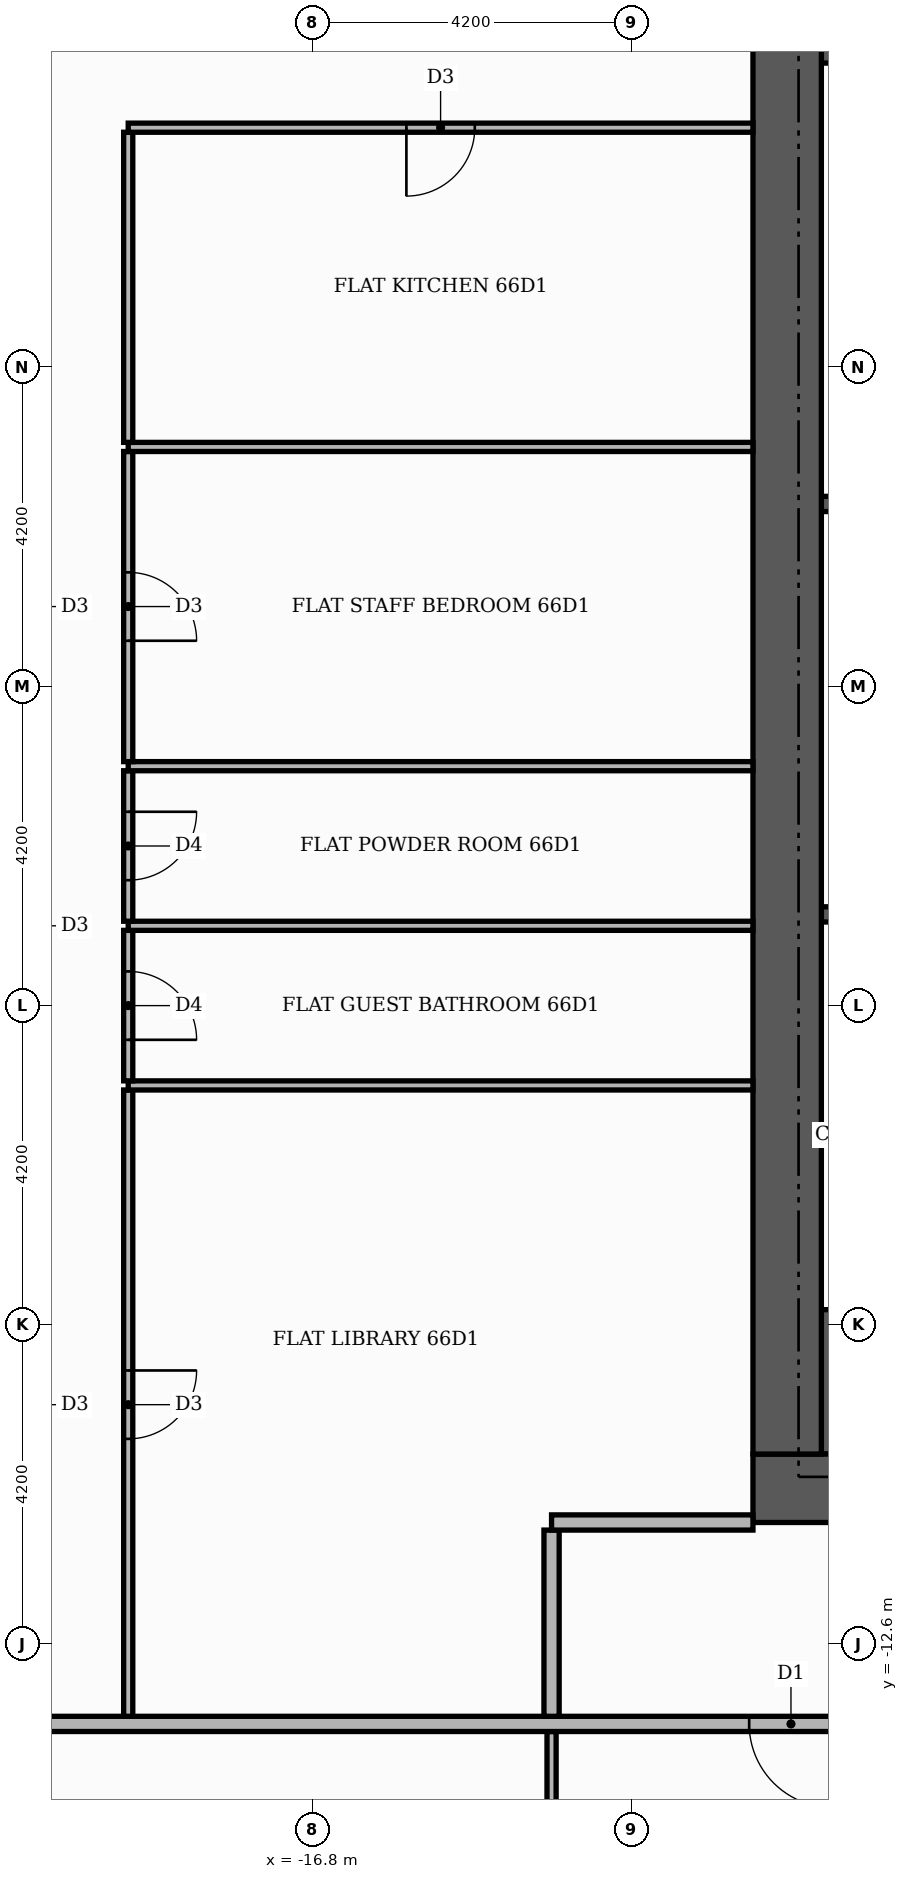
"""IFC4 building model, lengths in metres.
Left out: names, types, materials, properties, quantities, classifications, styles, units other than length and angle.
Written with IfcOpenShell. Run it as: python <this file> out.ifc"""

import sys

from ifc_helpers import new_model, si_unit, direction, frame, frame_2d, origin, place, context, subcontext, project, spatial, rectangle, extrude, element, fill, save


model = new_model("IFC4")
c1 = context("Model", 3, precision=1e-05, world=origin(), true_north=direction((0.0, 1.0)))
c2 = subcontext(c1, "Body", "Model", "MODEL_VIEW")
j1 = project(units=[si_unit("LENGTHUNIT", "METRE"), si_unit("PLANEANGLEUNIT", "RADIAN")], contexts=[c1])
p1 = place(None, origin())
s1 = spatial("IfcSite", under=j1, at=p1, CompositionType="ELEMENT")
p2 = place(p1, origin())
s2 = spatial("IfcBuilding", under=s1, at=p2, CompositionType="ELEMENT")
p3 = place(p2, frame((0.0, 0.0, 275.7)))
s3 = spatial("IfcBuildingStorey", under=s2, at=p3, CompositionType="ELEMENT", Elevation=275.7)
for number, where, z_axis, x_axis in (
    (1, (-10.1, -9.15, 0.0), (0.0, 0.0, 1.0), (1.0, 0.0, 0.0)),
    (2, (-10.1, 9.15, 0.0), (0.0, 0.0, 1.0), (1.0, 0.0, 0.0)),
):
    element("IfcWall", number, at=place(p3, frame(where, z_axis=z_axis, x_axis=x_axis)), inside=s3, PredefinedType="SHEAR", context=c2, shape_type="SweptSolid", body=[
        extrude(rectangle(XDim=4.6, YDim=1.9, at=frame_2d((2.3, 0.0))), origin(), (0.0, 0.0, 1.0), 3.48),
    ])
for number, where, z_axis, x_axis in (
    (3, (-10.1, -3.0, 0.0), (0.0, 0.0, 1.0), (1.0, 0.0, 0.0)),
    (4, (-10.1, 2.4, 0.0), (0.0, 0.0, 1.0), (1.0, 0.0, 0.0)),
):
    element("IfcWall", number, at=place(p3, frame(where, z_axis=z_axis, x_axis=x_axis)), inside=s3, PredefinedType="SHEAR", context=c2, shape_type="SweptSolid", body=[
        extrude(rectangle(XDim=0.9, YDim=0.2, at=frame_2d((0.45, 0.0))), origin(), (0.0, 0.0, 1.0), 3.48),
    ])
p4 = place(p3, frame((-11.0, -10.55, 0.0), z_axis=(0.0, 0.0, 1.0), x_axis=(1.0, 0.0, 0.0)))
e5 = element("IfcWall", 5, at=p4, inside=s3, PredefinedType="SHEAR", context=c2, shape_type="SweptSolid", body=[
    extrude(rectangle(XDim=22.0, YDim=0.9, at=frame_2d((11.0, 0.0))), origin(), (0.0, 0.0, 1.0), 3.48),
])
p5 = place(p4, frame((7.4, 0.0, 0.0)))
e6 = element("IfcOpeningElement", 6, at=p5, cuts=e5, PredefinedType="OPENING", context=c2, shape_type="SweptSolid", body=[
    extrude(rectangle(XDim=1.8, YDim=2.2, at=frame_2d((0.9, 1.1))), frame((0.0, 0.46, 0.0), z_axis=(0.0, -1.0, 0.0), x_axis=(1.0, 0.0, 0.0)), (0.0, 0.0, 1.0), 0.92),
])
p6 = place(p3, frame((-10.55, -10.1, 0.0), z_axis=(0.0, 0.0, 1.0), x_axis=(0.0, 1.0, 0.0)))
e7 = element("IfcWall", 7, at=p6, inside=s3, PredefinedType="SHEAR", context=c2, shape_type="SweptSolid", body=[
    extrude(rectangle(XDim=20.2, YDim=0.9, at=frame_2d((10.1, 0.0))), origin(), (0.0, 0.0, 1.0), 3.48),
])
p7 = place(p3, frame((-13.65, -20.36, 0.0), z_axis=(0.0, 0.0, 1.0), x_axis=(0.0, 1.0, 0.0)))
e8 = element("IfcWall", 8, at=p7, inside=s3, PredefinedType="PARTITIONING", context=c2, shape_type="SweptSolid", body=[
    extrude(rectangle(XDim=6.61, YDim=0.12, at=frame_2d((3.305, 0.0))), origin(), (0.0, 0.0, 1.0), 3.48),
])
p8 = place(p7, frame((2.875, 0.0, 0.0)))
e9 = element("IfcOpeningElement", 9, at=p8, cuts=e8, PredefinedType="OPENING", context=c2, shape_type="SweptSolid", body=[
    extrude(rectangle(XDim=0.9, YDim=2.1, at=frame_2d((0.45, 1.05))), frame((0.0, 0.07, 0.0), z_axis=(0.0, -1.0, 0.0), x_axis=(1.0, 0.0, 0.0)), (0.0, 0.0, 1.0), 0.14),
])
p9 = place(p3, frame((-25.42, -13.65, 0.0), z_axis=(0.0, 0.0, 1.0), x_axis=(1.0, 0.0, 0.0)))
e10 = element("IfcWall", 10, at=p9, inside=s3, PredefinedType="PARTITIONING", context=c2, shape_type="SweptSolid", body=[
    extrude(rectangle(XDim=39.07, YDim=0.2, at=frame_2d((19.535, 0.0))), origin(), (0.0, 0.0, 1.0), 3.48),
])
p10 = place(p9, frame((14.37, 0.0, 0.0)))
e11 = element("IfcOpeningElement", 11, at=p10, cuts=e10, PredefinedType="OPENING", context=c2, shape_type="SweptSolid", body=[
    extrude(rectangle(XDim=1.1, YDim=2.4, at=frame_2d((0.55, 1.2))), frame((0.0, 0.11, 0.0), z_axis=(0.0, -1.0, 0.0), x_axis=(1.0, 0.0, 0.0)), (0.0, 0.0, 1.0), 0.22),
])
p11 = place(p3, frame((-19.22, -13.55, 0.0), z_axis=(0.0, 0.0, 1.0), x_axis=(0.0, 1.0, 0.0)))
e12 = element("IfcWall", 12, at=p11, inside=s3, PredefinedType="PARTITIONING", context=c2, shape_type="SweptSolid", body=[
    extrude(rectangle(XDim=8.24, YDim=0.12, at=frame_2d((4.12, 0.0))), origin(), (0.0, 0.0, 1.0), 3.48),
])
p12 = place(p11, frame((3.65, 0.0, 0.0)))
e13 = element("IfcOpeningElement", 13, at=p12, cuts=e12, PredefinedType="OPENING", context=c2, shape_type="SweptSolid", body=[
    extrude(rectangle(XDim=0.9, YDim=2.1, at=frame_2d((0.45, 1.05))), frame((0.0, 0.07, 0.0), z_axis=(0.0, -1.0, 0.0), x_axis=(1.0, 0.0, 0.0)), (0.0, 0.0, 1.0), 0.14),
])
p13 = place(p3, frame((-13.65, -13.55, 0.0), z_axis=(0.0, 0.0, 1.0), x_axis=(0.0, 1.0, 0.0)))
e14 = element("IfcWall", 14, at=p13, inside=s3, PredefinedType="PARTITIONING", context=c2, shape_type="SweptSolid", body=[
    extrude(rectangle(XDim=2.45, YDim=0.2, at=frame_2d((1.225, 0.0))), origin(), (0.0, 0.0, 1.0), 3.48),
])
p14 = place(p3, frame((-13.65, -11.0, 0.0), z_axis=(0.0, 0.0, 1.0), x_axis=(1.0, 0.0, 0.0)))
e15 = element("IfcWall", 15, at=p14, inside=s3, PredefinedType="PARTITIONING", context=c2, shape_type="SweptSolid", body=[
    extrude(rectangle(XDim=2.65, YDim=0.2, at=frame_2d((1.325, 0.0))), origin(), (0.0, 0.0, 1.0), 3.48),
])
p15 = place(p3, frame((-19.22, -5.25, 0.0), z_axis=(0.0, 0.0, 1.0), x_axis=(1.0, 0.0, 0.0)))
e16 = element("IfcWall", 16, at=p15, inside=s3, PredefinedType="PARTITIONING", context=c2, shape_type="SweptSolid", body=[
    extrude(rectangle(XDim=8.22, YDim=0.12, at=frame_2d((4.11, 0.0))), origin(), (0.0, 0.0, 1.0), 3.48),
])
p16 = place(p3, frame((-19.22, -5.19, 0.0), z_axis=(0.0, 0.0, 1.0), x_axis=(0.0, 1.0, 0.0)))
e17 = element("IfcWall", 17, at=p16, inside=s3, PredefinedType="PARTITIONING", context=c2, shape_type="SweptSolid", body=[
    extrude(rectangle(XDim=1.98, YDim=0.12, at=frame_2d((0.99, 0.0))), origin(), (0.0, 0.0, 1.0), 3.48),
])
p17 = place(p16, frame((0.54, 0.0, 0.0)))
e18 = element("IfcOpeningElement", 18, at=p17, cuts=e17, PredefinedType="OPENING", context=c2, shape_type="SweptSolid", body=[
    extrude(rectangle(XDim=0.9, YDim=2.1, at=frame_2d((0.45, 1.05))), frame((0.0, 0.07, 0.0), z_axis=(0.0, -1.0, 0.0), x_axis=(1.0, 0.0, 0.0)), (0.0, 0.0, 1.0), 0.14),
])
p18 = place(p3, frame((-19.22, -3.15, 0.0), z_axis=(0.0, 0.0, 1.0), x_axis=(1.0, 0.0, 0.0)))
e19 = element("IfcWall", 19, at=p18, inside=s3, PredefinedType="PARTITIONING", context=c2, shape_type="SweptSolid", body=[
    extrude(rectangle(XDim=8.22, YDim=0.12, at=frame_2d((4.11, 0.0))), origin(), (0.0, 0.0, 1.0), 3.48),
])
p19 = place(p3, frame((-19.22, -3.09, 0.0), z_axis=(0.0, 0.0, 1.0), x_axis=(0.0, 1.0, 0.0)))
e20 = element("IfcWall", 20, at=p19, inside=s3, PredefinedType="PARTITIONING", context=c2, shape_type="SweptSolid", body=[
    extrude(rectangle(XDim=1.98, YDim=0.12, at=frame_2d((0.99, 0.0))), origin(), (0.0, 0.0, 1.0), 3.48),
])
p20 = place(p19, frame((0.54, 0.0, 0.0)))
e21 = element("IfcOpeningElement", 21, at=p20, cuts=e20, PredefinedType="OPENING", context=c2, shape_type="SweptSolid", body=[
    extrude(rectangle(XDim=0.9, YDim=2.1, at=frame_2d((0.45, 1.05))), frame((0.0, 0.07, 0.0), z_axis=(0.0, -1.0, 0.0), x_axis=(1.0, 0.0, 0.0)), (0.0, 0.0, 1.0), 0.14),
])
p21 = place(p3, frame((-19.22, -1.05, 0.0), z_axis=(0.0, 0.0, 1.0), x_axis=(1.0, 0.0, 0.0)))
e22 = element("IfcWall", 22, at=p21, inside=s3, PredefinedType="PARTITIONING", context=c2, shape_type="SweptSolid", body=[
    extrude(rectangle(XDim=8.22, YDim=0.12, at=frame_2d((4.11, 0.0))), origin(), (0.0, 0.0, 1.0), 3.48),
])
p22 = place(p3, frame((-19.22, -0.99, 0.0), z_axis=(0.0, 0.0, 1.0), x_axis=(0.0, 1.0, 0.0)))
e23 = element("IfcWall", 23, at=p22, inside=s3, PredefinedType="PARTITIONING", context=c2, shape_type="SweptSolid", body=[
    extrude(rectangle(XDim=4.08, YDim=0.12, at=frame_2d((2.04, 0.0))), origin(), (0.0, 0.0, 1.0), 3.48),
])
p23 = place(p22, frame((1.59, 0.0, 0.0)))
e24 = element("IfcOpeningElement", 24, at=p23, cuts=e23, PredefinedType="OPENING", context=c2, shape_type="SweptSolid", body=[
    extrude(rectangle(XDim=0.9, YDim=2.1, at=frame_2d((0.45, 1.05))), frame((0.0, 0.07, 0.0), z_axis=(0.0, -1.0, 0.0), x_axis=(1.0, 0.0, 0.0)), (0.0, 0.0, 1.0), 0.14),
])
p24 = place(p3, frame((-19.22, 3.15, 0.0), z_axis=(0.0, 0.0, 1.0), x_axis=(1.0, 0.0, 0.0)))
e25 = element("IfcWall", 25, at=p24, inside=s3, PredefinedType="PARTITIONING", context=c2, shape_type="SweptSolid", body=[
    extrude(rectangle(XDim=8.22, YDim=0.12, at=frame_2d((4.11, 0.0))), origin(), (0.0, 0.0, 1.0), 3.48),
])
p25 = place(p3, frame((-19.22, 3.21, 0.0), z_axis=(0.0, 0.0, 1.0), x_axis=(0.0, 1.0, 0.0)))
e26 = element("IfcWall", 26, at=p25, inside=s3, PredefinedType="PARTITIONING", context=c2, shape_type="SweptSolid", body=[
    extrude(rectangle(XDim=4.08, YDim=0.12, at=frame_2d((2.04, 0.0))), origin(), (0.0, 0.0, 1.0), 3.48),
])
p26 = place(p3, frame((-19.22, 7.35, 0.0), z_axis=(0.0, 0.0, 1.0), x_axis=(1.0, 0.0, 0.0)))
e27 = element("IfcWall", 27, at=p26, inside=s3, PredefinedType="PARTITIONING", context=c2, shape_type="SweptSolid", body=[
    extrude(rectangle(XDim=8.22, YDim=0.12, at=frame_2d((4.11, 0.0))), origin(), (0.0, 0.0, 1.0), 3.48),
])
p27 = place(p26, frame((3.66, 0.0, 0.0)))
e28 = element("IfcOpeningElement", 28, at=p27, cuts=e27, PredefinedType="OPENING", context=c2, shape_type="SweptSolid", body=[
    extrude(rectangle(XDim=0.9, YDim=2.1, at=frame_2d((0.45, 1.05))), frame((0.0, 0.07, 0.0), z_axis=(0.0, -1.0, 0.0), x_axis=(1.0, 0.0, 0.0)), (0.0, 0.0, 1.0), 0.14),
])
p28 = place(p10, frame((1.1, 0.0, 0.0), z_axis=(0.0, 0.0, 1.0), x_axis=(-1.0, 0.0, 0.0)))
e29 = element("IfcDoor", 29, at=p28, inside=s3, OperationType="SINGLE_SWING_RIGHT", PredefinedType="DOOR", context=c2, shape_type="SweptSolid", body=[
    extrude(rectangle(XDim=1.1, YDim=2.4, at=frame_2d((0.55, 1.2))), frame((0.0, 0.025, 0.0), z_axis=(0.0, -1.0, 0.0), x_axis=(1.0, 0.0, 0.0)), (0.0, 0.0, 1.0), 0.05),
])
fill(e11, e29)
p29 = place(p27, frame((0.9, 0.0, 0.0), z_axis=(0.0, 0.0, 1.0), x_axis=(-1.0, 0.0, 0.0)))
e30 = element("IfcDoor", 30, at=p29, inside=s3, OperationType="SINGLE_SWING_LEFT", PredefinedType="DOOR", context=c2, shape_type="SweptSolid", body=[
    extrude(rectangle(XDim=0.9, YDim=2.1, at=frame_2d((0.45, 1.05))), frame((0.0, 0.025, 0.0), z_axis=(0.0, -1.0, 0.0), x_axis=(1.0, 0.0, 0.0)), (0.0, 0.0, 1.0), 0.05),
])
fill(e28, e30)
p30 = place(p23, frame((0.9, 0.0, 0.0), z_axis=(0.0, 0.0, 1.0), x_axis=(-1.0, 0.0, 0.0)))
e31 = element("IfcDoor", 31, at=p30, inside=s3, OperationType="SINGLE_SWING_LEFT", PredefinedType="DOOR", context=c2, shape_type="SweptSolid", body=[
    extrude(rectangle(XDim=0.9, YDim=2.1, at=frame_2d((0.45, 1.05))), frame((0.0, 0.025, 0.0), z_axis=(0.0, -1.0, 0.0), x_axis=(1.0, 0.0, 0.0)), (0.0, 0.0, 1.0), 0.05),
])
fill(e24, e31)
p31 = place(p20, frame((0.9, 0.0, 0.0), z_axis=(0.0, 0.0, 1.0), x_axis=(-1.0, 0.0, 0.0)))
e32 = element("IfcDoor", 32, at=p31, inside=s3, OperationType="SINGLE_SWING_RIGHT", PredefinedType="DOOR", context=c2, shape_type="SweptSolid", body=[
    extrude(rectangle(XDim=0.9, YDim=2.1, at=frame_2d((0.45, 1.05))), frame((0.0, 0.025, 0.0), z_axis=(0.0, -1.0, 0.0), x_axis=(1.0, 0.0, 0.0)), (0.0, 0.0, 1.0), 0.05),
])
fill(e21, e32)
p32 = place(p17, frame((0.9, 0.0, 0.0), z_axis=(0.0, 0.0, 1.0), x_axis=(-1.0, 0.0, 0.0)))
e33 = element("IfcDoor", 33, at=p32, inside=s3, OperationType="SINGLE_SWING_LEFT", PredefinedType="DOOR", context=c2, shape_type="SweptSolid", body=[
    extrude(rectangle(XDim=0.9, YDim=2.1, at=frame_2d((0.45, 1.05))), frame((0.0, 0.025, 0.0), z_axis=(0.0, -1.0, 0.0), x_axis=(1.0, 0.0, 0.0)), (0.0, 0.0, 1.0), 0.05),
])
fill(e18, e33)
p33 = place(p12, frame((0.9, 0.0, 0.0), z_axis=(0.0, 0.0, 1.0), x_axis=(-1.0, 0.0, 0.0)))
e34 = element("IfcDoor", 34, at=p33, inside=s3, OperationType="SINGLE_SWING_RIGHT", PredefinedType="DOOR", context=c2, shape_type="SweptSolid", body=[
    extrude(rectangle(XDim=0.9, YDim=2.1, at=frame_2d((0.45, 1.05))), frame((0.0, 0.025, 0.0), z_axis=(0.0, -1.0, 0.0), x_axis=(1.0, 0.0, 0.0)), (0.0, 0.0, 1.0), 0.05),
])
fill(e13, e34)
save(model, sys.argv[1])
